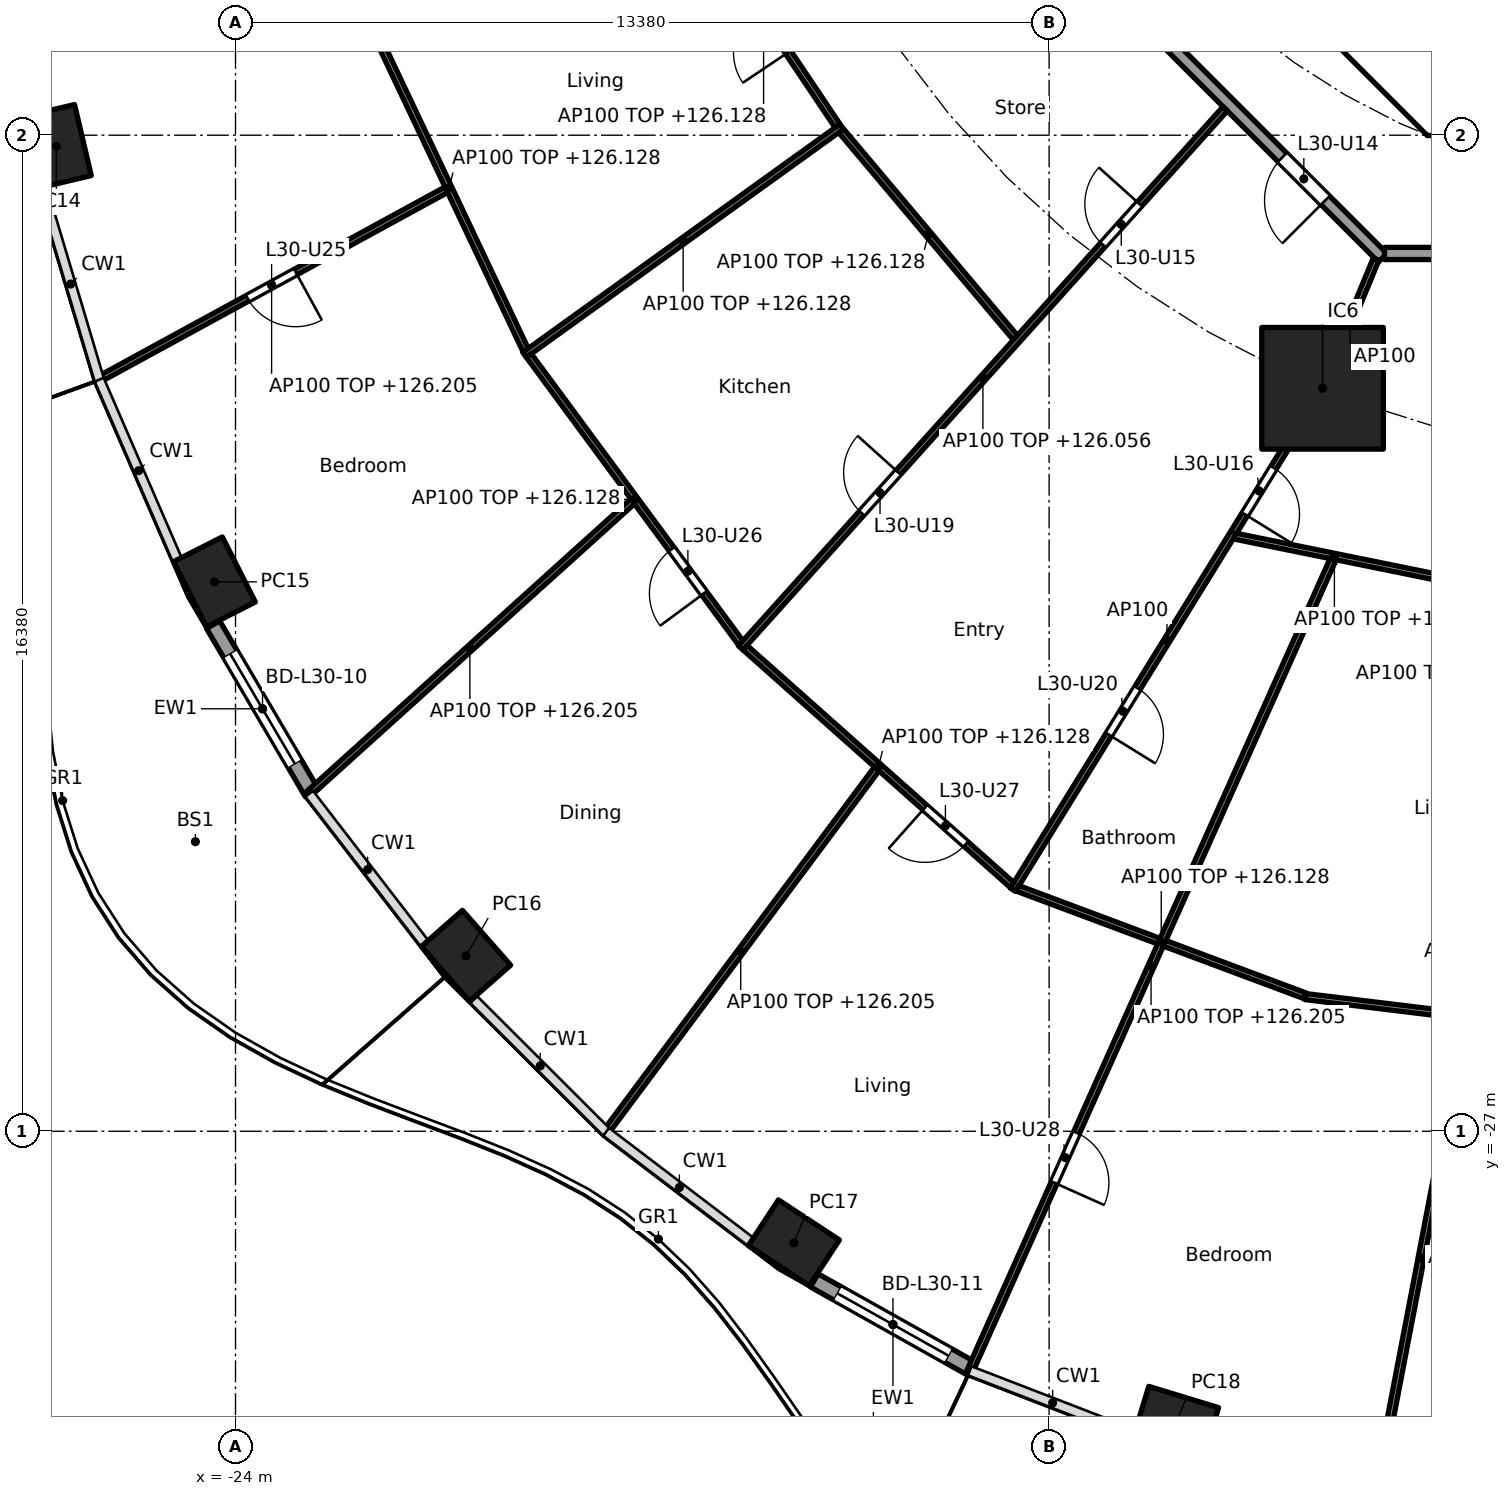
"""IFC4 building model, lengths in metres.
Left out: names, types, materials, properties, quantities, classifications, styles, units other than length and angle.
Written with IfcOpenShell. Run it as: python <this file> out.ifc"""

import sys

from ifc_helpers import new_model, si_unit, direction, frame, frame_2d, origin, origin_2d, place, context, subcontext, project, spatial, polyline, rectangle, hollow_rectangle, outline, extrude, element, fill, save


model = new_model("IFC4")
c1 = context("Model", 3, precision=1e-05, world=origin(), true_north=direction((0.0, 1.0)))
c2 = subcontext(c1, "Body", "Model", "MODEL_VIEW")
j1 = project(units=[si_unit("LENGTHUNIT", "METRE"), si_unit("PLANEANGLEUNIT", "RADIAN")], contexts=[c1])
p1 = place(None, origin())
s1 = spatial("IfcSite", under=j1, at=p1, CompositionType="ELEMENT")
p2 = place(p1, origin())
s2 = spatial("IfcBuilding", under=s1, at=p2, CompositionType="ELEMENT")
p3 = place(p2, frame((0.0, 0.0, 123.3)))
s3 = spatial("IfcBuildingStorey", under=s2, at=p3, CompositionType="ELEMENT", Elevation=123.3)
for number, where, z_axis, x_axis in (
    (1, (-26.948, -10.803, 0.0), (0.0, 0.0, 1.0), (0.229, -0.973, 0.0)),
    (2, (-24.347, -17.965, 0.0), (0.0, 0.0, 1.0), (0.452, -0.892, 0.0)),
    (3, (-20.209, -24.115, 0.0), (0.0, 0.0, 1.0), (0.66, -0.751, 0.0)),
    (4, (-14.817, -28.834, 0.0), (0.0, 0.0, 1.0), (0.836, -0.549, 0.0)),
    (5, (-8.538, -31.801, 0.0), (0.0, 0.0, 1.0), (0.957, -0.292, 0.0)),
):
    element("IfcColumn", number, at=place(p3, frame(where, z_axis=z_axis, x_axis=x_axis)), inside=s3, PredefinedType="COLUMN", context=c2, shape_type="SweptSolid", body=[
        extrude(hollow_rectangle(XDim=1.2, YDim=0.9, WallThickness=0.04, at=origin_2d()), origin(), (0.0, 0.0, 1.0), 3.7),
    ])
p4 = place(p3, frame((-6.123, -14.782, 0.0), z_axis=(0.0, 0.0, 1.0), x_axis=(1.0, 0.0, 0.0)))
e6 = element("IfcColumn", 6, at=p4, inside=s3, PredefinedType="COLUMN", context=c2, shape_type="SweptSolid", body=[
    extrude(rectangle(XDim=2.0, YDim=2.0, at=origin_2d()), origin(), (0.0, 0.0, 1.0), 3.7),
])
p5 = place(p3, frame((-22.744, -21.436, 0.0), z_axis=(0.0, 0.0, 1.0), x_axis=(-0.506314982873, 0.862348617508, 0.0)))
e7 = element("IfcWall", 7, at=p5, inside=s3, PredefinedType="SOLIDWALL", context=c2, shape_type="SweptSolid", body=[
    extrude(rectangle(XDim=3.208, YDim=0.25, at=frame_2d((1.604, 0.0))), origin(), (0.0, 0.0, 1.0), 3.44),
])
p6 = place(p5, frame((0.554, 0.0, 0.0)))
e8 = element("IfcOpeningElement", 8, at=p6, cuts=e7, PredefinedType="OPENING", context=c2, shape_type="SweptSolid", body=[
    extrude(rectangle(XDim=2.1, YDim=2.4, at=frame_2d((1.05, 1.2))), frame((0.0, 0.135, 0.0), z_axis=(0.0, -1.0, 0.0), x_axis=(1.0, 0.0, 0.0)), (0.0, 0.0, 1.0), 0.27),
])
p7 = place(p3, frame((-11.893, -30.905, 0.0), z_axis=(0.0, 0.0, 1.0), x_axis=(-0.87206688547, 0.489386705241, 0.0)))
e9 = element("IfcWall", 9, at=p7, inside=s3, PredefinedType="SOLIDWALL", context=c2, shape_type="SweptSolid", body=[
    extrude(rectangle(XDim=2.97, YDim=0.25, at=frame_2d((1.485, 0.0))), origin(), (0.0, 0.0, 1.0), 3.44),
])
p8 = place(p7, frame((0.435, 0.0, 0.0)))
e10 = element("IfcOpeningElement", 10, at=p8, cuts=e9, PredefinedType="OPENING", context=c2, shape_type="SweptSolid", body=[
    extrude(rectangle(XDim=2.1, YDim=2.4, at=frame_2d((1.05, 1.2))), frame((0.0, 0.135, 0.0), z_axis=(0.0, -1.0, 0.0), x_axis=(1.0, 0.0, 0.0)), (0.0, 0.0, 1.0), 0.27),
])
p9 = place(p3, frame((-9.988, -4.613, 0.0), z_axis=(0.0, 0.0, 1.0), x_axis=(0.707106781187, -0.707106781187, 0.0)))
e11 = element("IfcWall", 11, at=p9, inside=s3, PredefinedType="SHEAR", context=c2, shape_type="SweptSolid", body=[
    extrude(rectangle(XDim=7.602, YDim=0.6, at=frame_2d((3.801, 0.0))), origin(), (0.0, 0.0, 1.0), 3.44),
])
p10 = place(p9, frame((6.151, 0.0, 0.0)))
e12 = element("IfcOpeningElement", 12, at=p10, cuts=e11, PredefinedType="OPENING", context=c2, shape_type="SweptSolid", body=[
    extrude(rectangle(XDim=1.1, YDim=2.1, at=frame_2d((0.55, 1.05))), frame((0.0, 0.31, 0.0), z_axis=(0.0, -1.0, 0.0), x_axis=(1.0, 0.0, 0.0)), (0.0, 0.0, 1.0), 0.62),
])
p11 = place(p3, origin())
e13 = element("IfcWall", 13, at=p11, inside=s3, PredefinedType="SHEAR", context=c2, shape_type="SweptSolid", body=[
    extrude(outline(polyline([(-4.152, -10.025), (4.152, -10.025), (4.401, -9.776), (4.825, -10.2), (4.401, -10.625), (-4.401, -10.625), (-4.825, -10.2), (-4.401, -9.776), (-4.152, -10.025)])), origin(), (0.0, 0.0, 1.0), 3.44),
])
p12 = place(p3, frame((-12.635, -5.134, 0.0), z_axis=(0.0, 0.0, 1.0), x_axis=(0.707106781187, -0.707106781187, 0.0)))
e14 = element("IfcWall", 14, at=p12, inside=s3, PredefinedType="PARTITIONING", context=c2, shape_type="SweptSolid", body=[
    extrude(rectangle(XDim=10.609, YDim=0.2, at=frame_2d((5.305, 0.0))), origin(), (0.0, 0.0, 1.0), 3.44),
])
p13 = place(p12, frame((8.274, 0.0, 0.0)))
e15 = element("IfcOpeningElement", 15, at=p13, cuts=e14, PredefinedType="OPENING", context=c2, shape_type="SweptSolid", body=[
    extrude(rectangle(XDim=1.0, YDim=2.1, at=frame_2d((0.5, 1.05))), frame((0.0, 0.11, 0.0), z_axis=(0.0, -1.0, 0.0), x_axis=(1.0, 0.0, 0.0)), (0.0, 0.0, 1.0), 0.22),
])
p14 = place(p3, frame((-5.104, -12.565, 0.0), z_axis=(0.0, 0.0, 1.0), x_axis=(1.0, 0.0, 0.0)))
e16 = element("IfcWall", 16, at=p14, inside=s3, PredefinedType="PARTITIONING", context=c2, shape_type="SweptSolid", body=[
    extrude(rectangle(XDim=10.409, YDim=0.2, at=frame_2d((5.205, 0.0))), origin(), (0.0, 0.0, 1.0), 3.44),
])
p15 = place(p3, frame((-16.532, -6.84, 0.0), z_axis=(0.0, 0.0, 1.0), x_axis=(0.556994773624, -0.830515997531, 0.0)))
e17 = element("IfcWall", 17, at=p15, inside=s3, PredefinedType="PARTITIONING", context=c2, shape_type="SweptSolid", body=[
    extrude(rectangle(XDim=4.366, YDim=0.1, at=frame_2d((2.183, 0.0))), origin(), (0.0, 0.0, 1.0), 2.828),
])
p16 = place(p15, frame((2.01, 0.0, 0.0)))
e18 = element("IfcOpeningElement", 18, at=p16, cuts=e17, PredefinedType="OPENING", context=c2, shape_type="SweptSolid", body=[
    extrude(rectangle(XDim=0.9, YDim=2.1, at=frame_2d((0.45, 1.05))), frame((0.0, 0.06, 0.0), z_axis=(0.0, -1.0, 0.0), x_axis=(1.0, 0.0, 0.0)), (0.0, 0.0, 1.0), 0.12),
])
p17 = place(p3, frame((-21.75, -8.826, 0.0), z_axis=(0.0, 0.0, 1.0), x_axis=(0.427739388908, -0.903902104863, 0.0)))
e19 = element("IfcWall", 19, at=p17, inside=s3, PredefinedType="PARTITIONING", context=c2, shape_type="SweptSolid", body=[
    extrude(rectangle(XDim=5.899, YDim=0.1, at=frame_2d((2.949, 0.0))), origin(), (0.0, 0.0, 1.0), 2.828),
])
p18 = place(p3, frame((-20.533, -11.516, 0.0), z_axis=(0.0, 0.0, 1.0), x_axis=(-0.877731656478, -0.479152521872, 0.0)))
e20 = element("IfcWall", 20, at=p18, inside=s3, PredefinedType="PARTITIONING", context=c2, shape_type="SweptSolid", body=[
    extrude(rectangle(XDim=6.548, YDim=0.1, at=frame_2d((3.274, 0.0))), origin(), (0.0, 0.0, 1.0), 2.905),
])
p19 = place(p18, frame((2.824, 0.0, 0.0)))
e21 = element("IfcOpeningElement", 21, at=p19, cuts=e20, PredefinedType="OPENING", context=c2, shape_type="SweptSolid", body=[
    extrude(rectangle(XDim=0.9, YDim=2.1, at=frame_2d((0.45, 1.05))), frame((0.0, 0.06, 0.0), z_axis=(0.0, -1.0, 0.0), x_axis=(1.0, 0.0, 0.0)), (0.0, 0.0, 1.0), 0.12),
])
p20 = place(p3, frame((-14.031, -10.479, 0.0), z_axis=(0.0, 0.0, 1.0), x_axis=(-0.811653955345, -0.584138559567, 0.0)))
e22 = element("IfcWall", 22, at=p20, inside=s3, PredefinedType="PARTITIONING", context=c2, shape_type="SweptSolid", body=[
    extrude(rectangle(XDim=6.426, YDim=0.1, at=frame_2d((3.213, 0.0))), origin(), (0.0, 0.0, 1.0), 2.828),
])
p21 = place(p3, frame((-14.04, -10.547, 0.0), z_axis=(0.0, 0.0, 1.0), x_axis=(0.644036028289, -0.764995159635, 0.0)))
e23 = element("IfcWall", 23, at=p21, inside=s3, PredefinedType="PARTITIONING", context=c2, shape_type="SweptSolid", body=[
    extrude(rectangle(XDim=4.448, YDim=0.1, at=frame_2d((2.224, 0.0))), origin(), (0.0, 0.0, 1.0), 2.828),
])
p22 = place(p3, frame((-19.176, -14.244, 0.0), z_axis=(0.0, 0.0, 1.0), x_axis=(0.593532053206, -0.80481035146, 0.0)))
e24 = element("IfcWall", 24, at=p22, inside=s3, PredefinedType="PARTITIONING", context=c2, shape_type="SweptSolid", body=[
    extrude(rectangle(XDim=5.876, YDim=0.1, at=frame_2d((2.938, 0.0))), origin(), (0.0, 0.0, 1.0), 2.828),
])
p23 = place(p22, frame((3.957, 0.0, 0.0)))
e25 = element("IfcOpeningElement", 25, at=p23, cuts=e24, PredefinedType="OPENING", context=c2, shape_type="SweptSolid", body=[
    extrude(rectangle(XDim=0.9, YDim=2.1, at=frame_2d((0.45, 1.05))), frame((0.0, 0.06, 0.0), z_axis=(0.0, -1.0, 0.0), x_axis=(1.0, 0.0, 0.0)), (0.0, 0.0, 1.0), 0.12),
])
p24 = place(p3, frame((-17.47, -16.642, 0.0), z_axis=(0.0, 0.0, 1.0), x_axis=(-0.742345465337, -0.670017320742, 0.0)))
e26 = element("IfcWall", 26, at=p24, inside=s3, PredefinedType="PARTITIONING", context=c2, shape_type="SweptSolid", body=[
    extrude(rectangle(XDim=7.21, YDim=0.1, at=frame_2d((3.605, 0.0))), origin(), (0.0, 0.0, 1.0), 2.905),
])
p25 = place(p3, frame((-7.725, -10.186, 0.0), z_axis=(0.0, 0.0, 1.0), x_axis=(-0.668498346565, -0.743713628112, 0.0)))
e27 = element("IfcWall", 27, at=p25, inside=s3, PredefinedType="PARTITIONING", context=c2, shape_type="SweptSolid", body=[
    extrude(rectangle(XDim=11.919, YDim=0.1, at=frame_2d((5.959, 0.0))), origin(), (0.0, 0.0, 1.0), 2.756),
])
p26 = place(p25, frame((2.106, 0.0, 0.0)))
e28 = element("IfcOpeningElement", 28, at=p26, cuts=e27, PredefinedType="OPENING", context=c2, shape_type="SweptSolid", body=[
    extrude(rectangle(XDim=0.9, YDim=2.1, at=frame_2d((0.45, 1.05))), frame((0.0, 0.06, 0.0), z_axis=(0.0, -1.0, 0.0), x_axis=(1.0, 0.0, 0.0)), (0.0, 0.0, 1.0), 0.12),
])
p27 = place(p25, frame((8.041, 0.0, 0.0)))
e29 = element("IfcOpeningElement", 29, at=p27, cuts=e27, PredefinedType="OPENING", context=c2, shape_type="SweptSolid", body=[
    extrude(rectangle(XDim=0.9, YDim=2.1, at=frame_2d((0.45, 1.05))), frame((0.0, 0.06, 0.0), z_axis=(0.0, -1.0, 0.0), x_axis=(1.0, 0.0, 0.0)), (0.0, 0.0, 1.0), 0.12),
])
p28 = place(p3, frame((-15.622, -19.046, 0.0), z_axis=(0.0, 0.0, 1.0), x_axis=(0.747342891849, -0.664438561496, 0.0)))
e30 = element("IfcWall", 30, at=p28, inside=s3, PredefinedType="PARTITIONING", context=c2, shape_type="SweptSolid", body=[
    extrude(rectangle(XDim=5.881, YDim=0.1, at=frame_2d((2.94, 0.0))), origin(), (0.0, 0.0, 1.0), 2.828),
])
p29 = place(p28, frame((3.961, 0.0, 0.0)))
e31 = element("IfcOpeningElement", 31, at=p29, cuts=e30, PredefinedType="OPENING", context=c2, shape_type="SweptSolid", body=[
    extrude(rectangle(XDim=0.9, YDim=2.1, at=frame_2d((0.45, 1.05))), frame((0.0, 0.06, 0.0), z_axis=(0.0, -1.0, 0.0), x_axis=(1.0, 0.0, 0.0)), (0.0, 0.0, 1.0), 0.12),
])
p30 = place(p3, frame((-13.454, -21.04, 0.0), z_axis=(0.0, 0.0, 1.0), x_axis=(-0.597848033124, -0.801609461826, 0.0)))
e32 = element("IfcWall", 32, at=p30, inside=s3, PredefinedType="PARTITIONING", context=c2, shape_type="SweptSolid", body=[
    extrude(rectangle(XDim=7.486, YDim=0.1, at=frame_2d((3.743, 0.0))), origin(), (0.0, 0.0, 1.0), 2.905),
])
p31 = place(p3, frame((-5.243, -12.657, 0.0), z_axis=(0.0, 0.0, 1.0), x_axis=(-0.382811769845, -0.923826362943, 0.0)))
e33 = element("IfcWall", 33, at=p31, inside=s3, PredefinedType="PARTITIONING", context=c2, shape_type="SweptSolid", body=[
    extrude(rectangle(XDim=2.25, YDim=0.1, at=frame_2d((1.125, 0.0))), origin(), (0.0, 0.0, 1.0), 3.44),
])
p32 = place(p3, frame((-6.149, -14.825, 0.0), z_axis=(0.0, 0.0, 1.0), x_axis=(-0.525396393596, -0.850857584791, 0.0)))
e34 = element("IfcWall", 34, at=p32, inside=s3, PredefinedType="PARTITIONING", context=c2, shape_type="SweptSolid", body=[
    extrude(rectangle(XDim=9.643, YDim=0.1, at=frame_2d((4.822, 0.0))), origin(), (0.0, 0.0, 1.0), 3.44),
])
p33 = place(p32, frame((1.485, 0.0, 0.0)))
e35 = element("IfcOpeningElement", 35, at=p33, cuts=e34, PredefinedType="OPENING", context=c2, shape_type="SweptSolid", body=[
    extrude(rectangle(XDim=0.9, YDim=2.1, at=frame_2d((0.45, 1.05))), frame((0.0, 0.06, 0.0), z_axis=(0.0, -1.0, 0.0), x_axis=(1.0, 0.0, 0.0)), (0.0, 0.0, 1.0), 0.12),
])
p34 = place(p32, frame((5.744, 0.0, 0.0)))
e36 = element("IfcOpeningElement", 36, at=p34, cuts=e34, PredefinedType="OPENING", context=c2, shape_type="SweptSolid", body=[
    extrude(rectangle(XDim=0.9, YDim=2.1, at=frame_2d((0.45, 1.05))), frame((0.0, 0.06, 0.0), z_axis=(0.0, -1.0, 0.0), x_axis=(1.0, 0.0, 0.0)), (0.0, 0.0, 1.0), 0.12),
])
p35 = place(p3, frame((-7.568, -17.212, 0.0), z_axis=(0.0, 0.0, 1.0), x_axis=(0.979967079473, -0.199159541946, 0.0)))
e37 = element("IfcWall", 37, at=p35, inside=s3, PredefinedType="PARTITIONING", context=c2, shape_type="SweptSolid", body=[
    extrude(rectangle(XDim=3.347, YDim=0.1, at=frame_2d((1.673, 0.0))), origin(), (0.0, 0.0, 1.0), 2.828),
])
p36 = place(p3, frame((-11.143, -23.004, 0.0), z_axis=(0.0, 0.0, 1.0), x_axis=(0.936721765635, -0.350074754567, 0.0)))
e38 = element("IfcWall", 38, at=p36, inside=s3, PredefinedType="PARTITIONING", context=c2, shape_type="SweptSolid", body=[
    extrude(rectangle(XDim=5.053, YDim=0.1, at=frame_2d((2.526, 0.0))), origin(), (0.0, 0.0, 1.0), 2.828),
])
p37 = place(p3, frame((-5.949, -17.591, 0.0), z_axis=(0.0, 0.0, 1.0), x_axis=(-0.40838467696, -0.912809923053, 0.0)))
e39 = element("IfcWall", 39, at=p37, inside=s3, PredefinedType="PARTITIONING", context=c2, shape_type="SweptSolid", body=[
    extrude(rectangle(XDim=14.665, YDim=0.1, at=frame_2d((7.333, 0.0))), origin(), (0.0, 0.0, 1.0), 2.905),
])
p38 = place(p37, frame((10.334, 0.0, 0.0)))
e40 = element("IfcOpeningElement", 40, at=p38, cuts=e39, PredefinedType="OPENING", context=c2, shape_type="SweptSolid", body=[
    extrude(rectangle(XDim=0.9, YDim=2.1, at=frame_2d((0.45, 1.05))), frame((0.0, 0.06, 0.0), z_axis=(0.0, -1.0, 0.0), x_axis=(1.0, 0.0, 0.0)), (0.0, 0.0, 1.0), 0.12),
])
p39 = place(p3, frame((-6.413, -24.784, 0.0), z_axis=(0.0, 0.0, 1.0), x_axis=(0.992690077723, -0.120691381588, 0.0)))
e41 = element("IfcWall", 41, at=p39, inside=s3, PredefinedType="PARTITIONING", context=c2, shape_type="SweptSolid", body=[
    extrude(rectangle(XDim=5.286, YDim=0.1, at=frame_2d((2.643, 0.0))), origin(), (0.0, 0.0, 1.0), 2.828),
])
p40 = place(p39, frame((3.539, 0.0, 0.0)))
e42 = element("IfcOpeningElement", 42, at=p40, cuts=e41, PredefinedType="OPENING", context=c2, shape_type="SweptSolid", body=[
    extrude(rectangle(XDim=0.9, YDim=2.1, at=frame_2d((0.45, 1.05))), frame((0.0, 0.06, 0.0), z_axis=(0.0, -1.0, 0.0), x_axis=(1.0, 0.0, 0.0)), (0.0, 0.0, 1.0), 0.12),
])
p41 = place(p3, frame((-3.749, -25.159, 0.0), z_axis=(0.0, 0.0, 1.0), x_axis=(-0.188392334675, -0.982093848996, 0.0)))
e43 = element("IfcWall", 43, at=p41, inside=s3, PredefinedType="PARTITIONING", context=c2, shape_type="SweptSolid", body=[
    extrude(rectangle(XDim=8.0, YDim=0.1, at=frame_2d((4.0, 0.0))), origin(), (0.0, 0.0, 1.0), 2.905),
])
p42 = place(p6, origin())
e44 = element("IfcDoor", 44, at=p42, inside=s3, OperationType="SLIDING_TO_LEFT", PredefinedType="DOOR", context=c2, shape_type="SweptSolid", body=[
    extrude(rectangle(XDim=2.1, YDim=2.4, at=frame_2d((1.05, 1.2))), frame((0.0, 0.025, 0.0), z_axis=(0.0, -1.0, 0.0), x_axis=(1.0, 0.0, 0.0)), (0.0, 0.0, 1.0), 0.05),
])
fill(e8, e44)
p43 = place(p8, origin())
e45 = element("IfcDoor", 45, at=p43, inside=s3, OperationType="SLIDING_TO_LEFT", PredefinedType="DOOR", context=c2, shape_type="SweptSolid", body=[
    extrude(rectangle(XDim=2.1, YDim=2.4, at=frame_2d((1.05, 1.2))), frame((0.0, 0.025, 0.0), z_axis=(0.0, -1.0, 0.0), x_axis=(1.0, 0.0, 0.0)), (0.0, 0.0, 1.0), 0.05),
])
fill(e10, e45)
p44 = place(p10, origin())
e46 = element("IfcDoor", 46, at=p44, inside=s3, OperationType="SINGLE_SWING_RIGHT", PredefinedType="DOOR", context=c2, shape_type="SweptSolid", body=[
    extrude(rectangle(XDim=1.1, YDim=2.1, at=frame_2d((0.55, 1.05))), frame((0.0, 0.025, 0.0), z_axis=(0.0, -1.0, 0.0), x_axis=(1.0, 0.0, 0.0)), (0.0, 0.0, 1.0), 0.05),
])
fill(e12, e46)
p45 = place(p13, frame((1.0, 0.0, 0.0), x_axis=(-1.0, 0.0, 0.0)))
e47 = element("IfcDoor", 47, at=p45, inside=s3, OperationType="SINGLE_SWING_LEFT", PredefinedType="DOOR", context=c2, shape_type="SweptSolid", body=[
    extrude(rectangle(XDim=1.0, YDim=2.1, at=frame_2d((0.5, 1.05))), frame((0.0, 0.025, 0.0), z_axis=(0.0, -1.0, 0.0), x_axis=(1.0, 0.0, 0.0)), (0.0, 0.0, 1.0), 0.05),
])
fill(e15, e47)
p46 = place(p26, frame((0.9, 0.0, 0.0), x_axis=(-1.0, 0.0, 0.0)))
e48 = element("IfcDoor", 48, at=p46, inside=s3, OperationType="SINGLE_SWING_RIGHT", PredefinedType="DOOR", context=c2, shape_type="SweptSolid", body=[
    extrude(rectangle(XDim=0.9, YDim=2.1, at=frame_2d((0.45, 1.05))), frame((0.0, 0.025, 0.0), z_axis=(0.0, -1.0, 0.0), x_axis=(1.0, 0.0, 0.0)), (0.0, 0.0, 1.0), 0.05),
])
fill(e28, e48)
p47 = place(p33, origin())
e49 = element("IfcDoor", 49, at=p47, inside=s3, OperationType="SINGLE_SWING_RIGHT", PredefinedType="DOOR", context=c2, shape_type="SweptSolid", body=[
    extrude(rectangle(XDim=0.9, YDim=2.1, at=frame_2d((0.45, 1.05))), frame((0.0, 0.025, 0.0), z_axis=(0.0, -1.0, 0.0), x_axis=(1.0, 0.0, 0.0)), (0.0, 0.0, 1.0), 0.05),
])
fill(e35, e49)
p48 = place(p16, frame((0.9, 0.0, 0.0), x_axis=(-1.0, 0.0, 0.0)))
e50 = element("IfcDoor", 50, at=p48, inside=s3, OperationType="SINGLE_SWING_LEFT", PredefinedType="DOOR", context=c2, shape_type="SweptSolid", body=[
    extrude(rectangle(XDim=0.9, YDim=2.1, at=frame_2d((0.45, 1.05))), frame((0.0, 0.025, 0.0), z_axis=(0.0, -1.0, 0.0), x_axis=(1.0, 0.0, 0.0)), (0.0, 0.0, 1.0), 0.05),
])
fill(e18, e50)
p49 = place(p27, frame((0.9, 0.0, 0.0), x_axis=(-1.0, 0.0, 0.0)))
e51 = element("IfcDoor", 51, at=p49, inside=s3, OperationType="SINGLE_SWING_RIGHT", PredefinedType="DOOR", context=c2, shape_type="SweptSolid", body=[
    extrude(rectangle(XDim=0.9, YDim=2.1, at=frame_2d((0.45, 1.05))), frame((0.0, 0.025, 0.0), z_axis=(0.0, -1.0, 0.0), x_axis=(1.0, 0.0, 0.0)), (0.0, 0.0, 1.0), 0.05),
])
fill(e29, e51)
p50 = place(p34, origin())
e52 = element("IfcDoor", 52, at=p50, inside=s3, OperationType="SINGLE_SWING_RIGHT", PredefinedType="DOOR", context=c2, shape_type="SweptSolid", body=[
    extrude(rectangle(XDim=0.9, YDim=2.1, at=frame_2d((0.45, 1.05))), frame((0.0, 0.025, 0.0), z_axis=(0.0, -1.0, 0.0), x_axis=(1.0, 0.0, 0.0)), (0.0, 0.0, 1.0), 0.05),
])
fill(e36, e52)
p51 = place(p19, origin())
e53 = element("IfcDoor", 53, at=p51, inside=s3, OperationType="SINGLE_SWING_LEFT", PredefinedType="DOOR", context=c2, shape_type="SweptSolid", body=[
    extrude(rectangle(XDim=0.9, YDim=2.1, at=frame_2d((0.45, 1.05))), frame((0.0, 0.025, 0.0), z_axis=(0.0, -1.0, 0.0), x_axis=(1.0, 0.0, 0.0)), (0.0, 0.0, 1.0), 0.05),
])
fill(e21, e53)
p52 = place(p23, frame((0.9, 0.0, 0.0), x_axis=(-1.0, 0.0, 0.0)))
e54 = element("IfcDoor", 54, at=p52, inside=s3, OperationType="SINGLE_SWING_LEFT", PredefinedType="DOOR", context=c2, shape_type="SweptSolid", body=[
    extrude(rectangle(XDim=0.9, YDim=2.1, at=frame_2d((0.45, 1.05))), frame((0.0, 0.025, 0.0), z_axis=(0.0, -1.0, 0.0), x_axis=(1.0, 0.0, 0.0)), (0.0, 0.0, 1.0), 0.05),
])
fill(e25, e54)
p53 = place(p29, frame((0.9, 0.0, 0.0), x_axis=(-1.0, 0.0, 0.0)))
e55 = element("IfcDoor", 55, at=p53, inside=s3, OperationType="SINGLE_SWING_RIGHT", PredefinedType="DOOR", context=c2, shape_type="SweptSolid", body=[
    extrude(rectangle(XDim=0.9, YDim=2.1, at=frame_2d((0.45, 1.05))), frame((0.0, 0.025, 0.0), z_axis=(0.0, -1.0, 0.0), x_axis=(1.0, 0.0, 0.0)), (0.0, 0.0, 1.0), 0.05),
])
fill(e31, e55)
p54 = place(p38, origin())
e56 = element("IfcDoor", 56, at=p54, inside=s3, OperationType="SINGLE_SWING_RIGHT", PredefinedType="DOOR", context=c2, shape_type="SweptSolid", body=[
    extrude(rectangle(XDim=0.9, YDim=2.1, at=frame_2d((0.45, 1.05))), frame((0.0, 0.025, 0.0), z_axis=(0.0, -1.0, 0.0), x_axis=(1.0, 0.0, 0.0)), (0.0, 0.0, 1.0), 0.05),
])
fill(e40, e56)
save(model, sys.argv[1])
